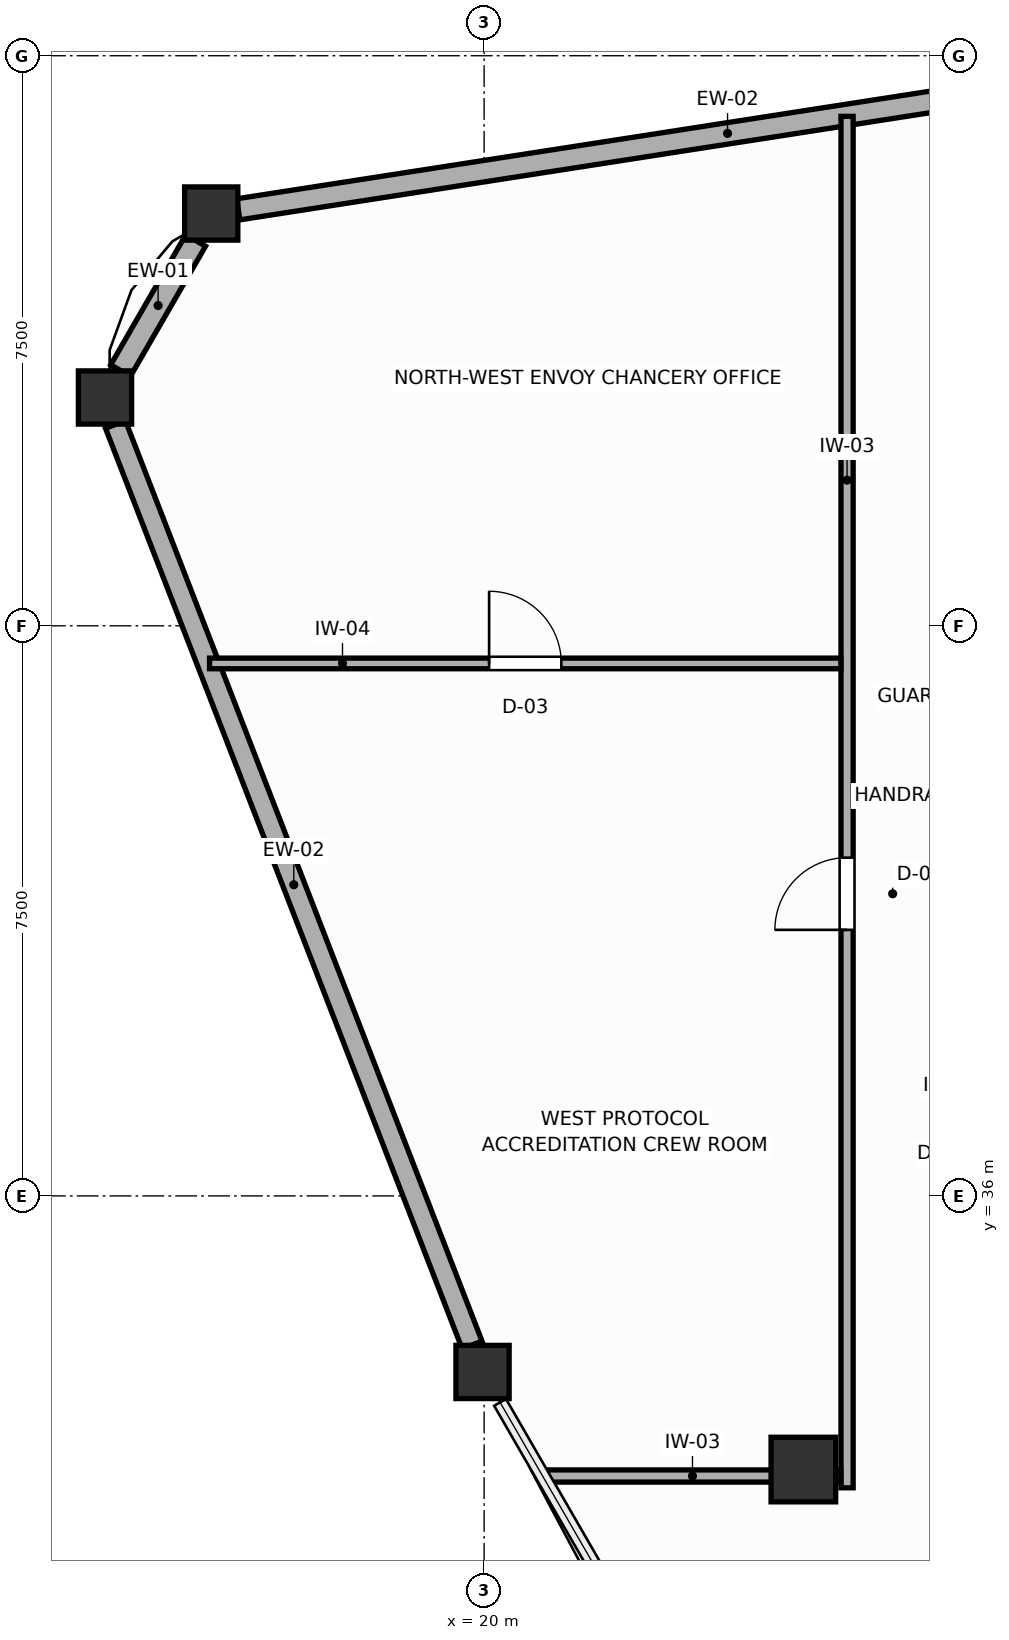
"""IFC4 building model, lengths in metres.
Left out: names, types, materials, properties, quantities, classifications, styles, units other than length and angle.
Written with IfcOpenShell. Run it as: python <this file> out.ifc"""

import sys

from ifc_helpers import new_model, si_unit, direction, frame, frame_2d, origin, origin_2d, place, context, subcontext, project, spatial, rectangle, extrude, source, transform, mapped, element, fill, save


model = new_model("IFC4")
c1 = context("Model", 3, precision=1e-05, world=origin(), true_north=direction((0.0, 1.0)))
c2 = subcontext(c1, "Body", "Model", "MODEL_VIEW")
j1 = project(units=[si_unit("LENGTHUNIT", "METRE"), si_unit("PLANEANGLEUNIT", "RADIAN")], contexts=[c1])
p1 = place(None, origin())
s1 = spatial("IfcSite", under=j1, at=p1, CompositionType="ELEMENT")
p2 = place(p1, origin())
s2 = spatial("IfcBuilding", under=s1, at=p2, CompositionType="ELEMENT")
p3 = place(p2, frame((0.0, 0.0, 243.0)))
s3 = spatial("IfcBuildingStorey", under=s2, at=p3, CompositionType="ELEMENT", Elevation=243.0)
m1 = source(origin(), c2, "Body", "SweptSolid", [
    extrude(rectangle(XDim=0.85, YDim=0.85, at=origin_2d()), origin(), (0.0, 0.0, 1.0), 3.6),
])
p4 = place(p3, frame((24.2, 32.4, 0.0), z_axis=(0.0, 0.0, 1.0), x_axis=(1.0, 0.0, 0.0)))
e1 = element("IfcColumn", 1, at=p4, inside=s3, PredefinedType="COLUMN", context=c2, shape_type="MappedRepresentation", body=[
    mapped(m1, transform((0.0, 0.0, 0.0), scale=1.0)),
])
m2 = source(origin(), c2, "Body", "SweptSolid", [
    extrude(rectangle(XDim=0.7, YDim=0.7, at=origin_2d()), origin(), (0.0, 0.0, 1.0), 3.6),
])
for number, where, z_axis, x_axis in (
    (2, (16.41, 48.924, 0.0), (0.0, 0.0, 1.0), (1.0, 0.0, 0.0)),
    (3, (15.012, 46.504, 0.0), (0.0, 0.0, 1.0), (1.0, 0.0, 0.0)),
    (4, (19.979, 33.684, 0.0), (0.0, 0.0, 1.0), (1.0, 0.0, 0.0)),
):
    element("IfcColumn", number, at=place(p3, frame(where, z_axis=z_axis, x_axis=x_axis)), inside=s3, PredefinedType="COLUMN", context=c2, shape_type="MappedRepresentation", body=[
        mapped(m2, transform((0.0, 0.0, 0.0), scale=1.0)),
    ])
p5 = place(p3, frame((29.641, 50.978, 0.0), z_axis=(0.0, 0.0, 1.0), x_axis=(-0.988170476673, -0.153359411293, 0.0)))
e5 = element("IfcWall", 5, at=p5, inside=s3, PredefinedType="SOLIDWALL", context=c2, shape_type="SweptSolid", body=[
    extrude(rectangle(XDim=13.03, YDim=0.28, at=frame_2d((6.515, 0.0))), origin(), (0.0, 0.0, 1.0), 3.08),
])
p6 = place(p3, frame((16.205, 48.569, 0.0), z_axis=(0.0, 0.0, 1.0), x_axis=(-0.499915072674, -0.866074431047, 0.0)))
e6 = element("IfcWall", 6, at=p6, inside=s3, PredefinedType="SOLIDWALL", context=c2, shape_type="SweptSolid", body=[
    extrude(rectangle(XDim=1.975, YDim=0.3, at=frame_2d((0.987, 0.0))), origin(), (0.0, 0.0, 1.0), 3.08),
])
p7 = place(p3, frame((15.15, 46.149, 0.0), z_axis=(0.0, 0.0, 1.0), x_axis=(0.361269378379, -0.93246149317, 0.0)))
e7 = element("IfcWall", 7, at=p7, inside=s3, PredefinedType="SOLIDWALL", context=c2, shape_type="SweptSolid", body=[
    extrude(rectangle(XDim=12.987, YDim=0.28, at=frame_2d((6.494, 0.0))), origin(), (0.0, 0.0, 1.0), 3.05),
])
p8 = place(p3, frame((24.775, 32.16, 0.0), z_axis=(0.0, 0.0, 1.0), x_axis=(0.0, 1.0, 0.0)))
e8 = element("IfcWall", 8, at=p8, inside=s3, PredefinedType="PARTITIONING", context=c2, shape_type="SweptSolid", body=[
    extrude(rectangle(XDim=18.042, YDim=0.16, at=frame_2d((9.021, 0.0))), origin(), (0.0, 0.0, 1.0), 3.41),
])
p9 = place(p8, frame((7.34, 0.0, 0.0)))
e9 = element("IfcOpeningElement", 9, at=p9, cuts=e8, PredefinedType="OPENING", context=c2, shape_type="SweptSolid", body=[
    extrude(rectangle(XDim=0.95, YDim=2.05, at=frame_2d((0.475, 1.025))), frame((0.0, 0.09, 0.0), z_axis=(0.0, -1.0, 0.0), x_axis=(1.0, 0.0, 0.0)), (0.0, 0.0, 1.0), 0.18),
])
p10 = place(p3, frame((20.789, 32.315, 0.0), z_axis=(0.0, 0.0, 1.0), x_axis=(1.0, 0.0, 0.0)))
e10 = element("IfcWall", 10, at=p10, inside=s3, PredefinedType="PARTITIONING", context=c2, shape_type="SweptSolid", body=[
    extrude(rectangle(XDim=3.904, YDim=0.16, at=frame_2d((1.952, 0.0))), origin(), (0.0, 0.0, 1.0), 3.08),
])
p11 = place(p3, frame((16.388, 43.005, 0.0), z_axis=(0.0, 0.0, 1.0), x_axis=(1.0, 0.0, 0.0)))
e11 = element("IfcWall", 11, at=p11, inside=s3, PredefinedType="PARTITIONING", context=c2, shape_type="SweptSolid", body=[
    extrude(rectangle(XDim=8.305, YDim=0.14, at=frame_2d((4.153, 0.0))), origin(), (0.0, 0.0, 1.0), 3.41),
])
p12 = place(p11, frame((3.678, 0.0, 0.0)))
e12 = element("IfcOpeningElement", 12, at=p12, cuts=e11, PredefinedType="OPENING", context=c2, shape_type="SweptSolid", body=[
    extrude(rectangle(XDim=0.95, YDim=2.05, at=frame_2d((0.475, 1.025))), frame((0.0, 0.08, 0.0), z_axis=(0.0, -1.0, 0.0), x_axis=(1.0, 0.0, 0.0)), (0.0, 0.0, 1.0), 0.16),
])
p13 = place(p9, origin())
e13 = element("IfcDoor", 13, at=p13, inside=s3, OperationType="SINGLE_SWING_LEFT", PredefinedType="DOOR", context=c2, shape_type="SweptSolid", body=[
    extrude(rectangle(XDim=0.95, YDim=2.05, at=frame_2d((0.475, 1.025))), frame((0.0, 0.025, 0.0), z_axis=(0.0, -1.0, 0.0), x_axis=(1.0, 0.0, 0.0)), (0.0, 0.0, 1.0), 0.05),
])
fill(e9, e13)
p14 = place(p12, origin())
e14 = element("IfcDoor", 14, at=p14, inside=s3, OperationType="SINGLE_SWING_LEFT", PredefinedType="DOOR", context=c2, shape_type="SweptSolid", body=[
    extrude(rectangle(XDim=0.95, YDim=2.05, at=frame_2d((0.475, 1.025))), frame((0.0, 0.025, 0.0), z_axis=(0.0, -1.0, 0.0), x_axis=(1.0, 0.0, 0.0)), (0.0, 0.0, 1.0), 0.05),
])
fill(e12, e14)
save(model, sys.argv[1])
